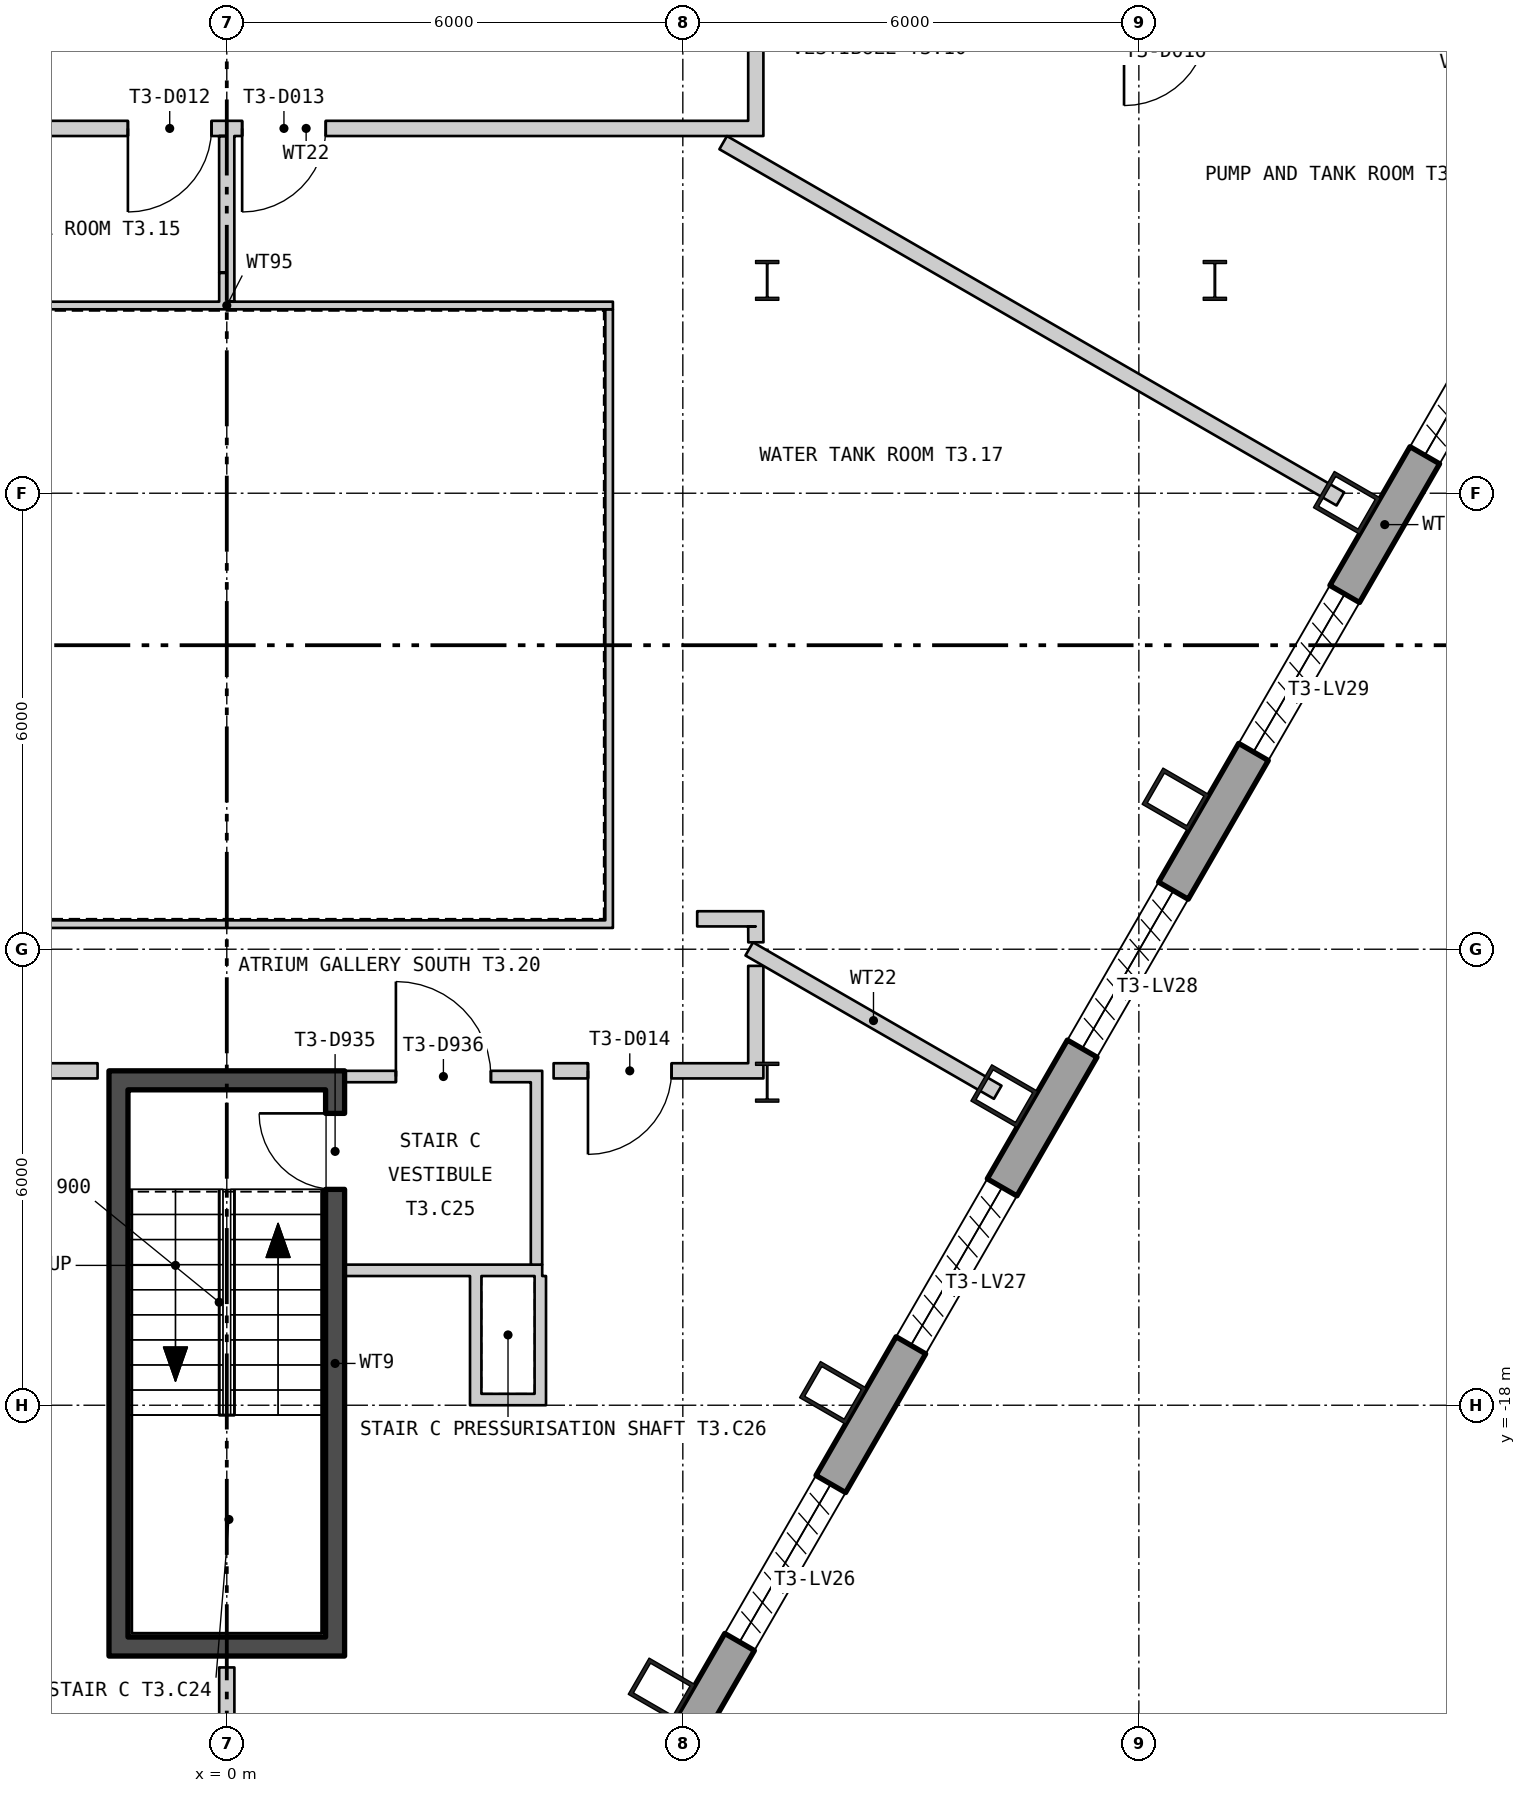
"""IFC4 building model, lengths in metres.
Left out: names, types, materials, properties, quantities, classifications, styles, units other than length and angle.
Written with IfcOpenShell. Run it as: python <this file> out.ifc"""

import sys

from ifc_helpers import new_model, si_unit, direction, frame, frame_2d, origin, origin_2d, place, context, subcontext, project, spatial, polyline, rectangle, hollow_rectangle, i_section, outline, extrude, element, fill, save


model = new_model("IFC4")
c1 = context("Model", 3, precision=1e-05, world=origin(), true_north=direction((0.0, 1.0)))
c2 = subcontext(c1, "Body", "Model", "MODEL_VIEW")
j1 = project(units=[si_unit("LENGTHUNIT", "METRE"), si_unit("PLANEANGLEUNIT", "RADIAN")], contexts=[c1])
p1 = place(None, origin())
s1 = spatial("IfcSite", under=j1, at=p1, CompositionType="ELEMENT")
p2 = place(p1, origin())
s2 = spatial("IfcBuilding", under=s1, at=p2, CompositionType="ELEMENT")
p3 = place(p2, frame((0.0, 0.0, 186.6)))
s3 = spatial("IfcBuildingStorey", under=s2, at=p3, CompositionType="ELEMENT", Elevation=186.6)
for number, where, z_axis, x_axis in (
    (1, (5.722, -21.74, 0.0), (0.0, 0.0, 1.0), (0.5, 0.866, 0.0)),
    (2, (7.976, -17.837, 0.0), (0.0, 0.0, 1.0), (0.5, 0.866, 0.0)),
    (3, (10.23, -13.933, 0.0), (0.0, 0.0, 1.0), (0.5, 0.866, 0.0)),
    (4, (12.483, -10.029, 0.0), (0.0, 0.0, 1.0), (0.5, 0.866, 0.0)),
    (5, (14.737, -6.126, 0.0), (0.0, 0.0, 1.0), (0.5, 0.866, 0.0)),
):
    element("IfcColumn", number, at=place(p3, frame(where, z_axis=z_axis, x_axis=x_axis)), inside=s3, PredefinedType="COLUMN", context=c2, shape_type="SweptSolid", body=[
        extrude(hollow_rectangle(XDim=0.55, YDim=0.7, WallThickness=0.05, at=origin_2d()), origin(), (0.0, 0.0, 1.0), 6.0),
    ])
for number, where, z_axis, x_axis in (
    (6, (7.11, -3.2, 0.0), (0.0, 0.0, 1.0), (1.0, 0.0, 0.0)),
    (7, (7.11, -13.75, 0.0), (0.0, 0.0, 1.0), (1.0, 0.0, 0.0)),
    (8, (13.0, -3.2, 0.0), (0.0, 0.0, 1.0), (1.0, 0.0, 0.0)),
):
    element("IfcColumn", number, at=place(p3, frame(where, z_axis=z_axis, x_axis=x_axis)), inside=s3, PredefinedType="COLUMN", context=c2, shape_type="SweptSolid", body=[
        extrude(i_section(OverallWidth=0.306, OverallDepth=0.524, WebThickness=0.021, FlangeThickness=0.04, at=origin_2d()), origin(), (0.0, 0.0, 1.0), 6.0),
    ])
p4 = place(p3, frame((3.8, -26.219, -0.18), z_axis=(0.0, 0.0, 1.0), x_axis=(0.500000711659, 0.866024992908, 0.0)))
e9 = element("IfcWall", 9, at=p4, inside=s3, PredefinedType="SOLIDWALL", context=c2, shape_type="SweptSolid", body=[
    extrude(outline(polyline([(-0.13, -0.225), (45.87, -0.225), (45.61, 0.225), (0.13, 0.225), (-0.13, -0.225)])), origin(), (0.0, 0.0, 1.0), 6.0),
])
p5 = place(p4, frame((1.424, 0.0, 1.38)))
e10 = element("IfcOpeningElement", 10, at=p5, cuts=e9, PredefinedType="OPENING", context=c2, shape_type="SweptSolid", body=[
    extrude(rectangle(XDim=2.4, YDim=3.6, at=frame_2d((1.2, 1.8))), frame((0.0, 0.235, 0.0), z_axis=(0.0, -1.0, 0.0), x_axis=(1.0, 0.0, 0.0)), (0.0, 0.0, 1.0), 0.47),
])
p6 = place(p4, frame((5.893, 0.0, 1.38)))
e11 = element("IfcOpeningElement", 11, at=p6, cuts=e9, PredefinedType="OPENING", context=c2, shape_type="SweptSolid", body=[
    extrude(rectangle(XDim=2.4, YDim=3.6, at=frame_2d((1.2, 1.8))), frame((0.0, 0.235, 0.0), z_axis=(0.0, -1.0, 0.0), x_axis=(1.0, 0.0, 0.0)), (0.0, 0.0, 1.0), 0.47),
])
p7 = place(p4, frame((10.401, 0.0, 1.38)))
e12 = element("IfcOpeningElement", 12, at=p7, cuts=e9, PredefinedType="OPENING", context=c2, shape_type="SweptSolid", body=[
    extrude(rectangle(XDim=2.4, YDim=3.6, at=frame_2d((1.2, 1.8))), frame((0.0, 0.235, 0.0), z_axis=(0.0, -1.0, 0.0), x_axis=(1.0, 0.0, 0.0)), (0.0, 0.0, 1.0), 0.47),
])
p8 = place(p4, frame((14.909, 0.0, 1.38)))
e13 = element("IfcOpeningElement", 13, at=p8, cuts=e9, PredefinedType="OPENING", context=c2, shape_type="SweptSolid", body=[
    extrude(rectangle(XDim=2.4, YDim=3.6, at=frame_2d((1.2, 1.8))), frame((0.0, 0.235, 0.0), z_axis=(0.0, -1.0, 0.0), x_axis=(1.0, 0.0, 0.0)), (0.0, 0.0, 1.0), 0.47),
])
p9 = place(p4, frame((19.416, 0.0, 1.38)))
e14 = element("IfcOpeningElement", 14, at=p9, cuts=e9, PredefinedType="OPENING", context=c2, shape_type="SweptSolid", body=[
    extrude(rectangle(XDim=2.4, YDim=3.6, at=frame_2d((1.2, 1.8))), frame((0.0, 0.235, 0.0), z_axis=(0.0, -1.0, 0.0), x_axis=(1.0, 0.0, 0.0)), (0.0, 0.0, 1.0), 0.47),
])
p10 = place(p4, frame((23.924, 0.0, 1.38)))
e15 = element("IfcOpeningElement", 15, at=p10, cuts=e9, PredefinedType="OPENING", context=c2, shape_type="SweptSolid", body=[
    extrude(rectangle(XDim=2.4, YDim=3.6, at=frame_2d((1.2, 1.8))), frame((0.0, 0.235, 0.0), z_axis=(0.0, -1.0, 0.0), x_axis=(1.0, 0.0, 0.0)), (0.0, 0.0, 1.0), 0.47),
])
p11 = place(p4, frame((28.431, 0.0, 1.38)))
e16 = element("IfcOpeningElement", 16, at=p11, cuts=e9, PredefinedType="OPENING", context=c2, shape_type="SweptSolid", body=[
    extrude(rectangle(XDim=2.4, YDim=3.6, at=frame_2d((1.2, 1.8))), frame((0.0, 0.235, 0.0), z_axis=(0.0, -1.0, 0.0), x_axis=(1.0, 0.0, 0.0)), (0.0, 0.0, 1.0), 0.47),
])
p12 = place(p4, frame((32.939, 0.0, 1.38)))
e17 = element("IfcOpeningElement", 17, at=p12, cuts=e9, PredefinedType="OPENING", context=c2, shape_type="SweptSolid", body=[
    extrude(rectangle(XDim=2.4, YDim=3.6, at=frame_2d((1.2, 1.8))), frame((0.0, 0.235, 0.0), z_axis=(0.0, -1.0, 0.0), x_axis=(1.0, 0.0, 0.0)), (0.0, 0.0, 1.0), 0.47),
])
p13 = place(p4, frame((37.447, 0.0, 1.38)))
e18 = element("IfcOpeningElement", 18, at=p13, cuts=e9, PredefinedType="OPENING", context=c2, shape_type="SweptSolid", body=[
    extrude(rectangle(XDim=2.4, YDim=3.6, at=frame_2d((1.2, 1.8))), frame((0.0, 0.235, 0.0), z_axis=(0.0, -1.0, 0.0), x_axis=(1.0, 0.0, 0.0)), (0.0, 0.0, 1.0), 0.47),
])
p14 = place(p4, frame((41.916, 0.0, 1.38)))
e19 = element("IfcOpeningElement", 19, at=p14, cuts=e9, PredefinedType="OPENING", context=c2, shape_type="SweptSolid", body=[
    extrude(rectangle(XDim=2.4, YDim=3.6, at=frame_2d((1.2, 1.8))), frame((0.0, 0.235, 0.0), z_axis=(0.0, -1.0, 0.0), x_axis=(1.0, 0.0, 0.0)), (0.0, 0.0, 1.0), 0.47),
])
p15 = place(p3, frame((-5.08, -11.67, 0.0), z_axis=(0.0, 0.0, 1.0), x_axis=(1.0, 0.0, 0.0)))
e20 = element("IfcWall", 20, at=p15, inside=s3, PredefinedType="PARTITIONING", context=c2, shape_type="SweptSolid", body=[
    extrude(rectangle(XDim=10.16, YDim=0.1, at=frame_2d((5.08, 0.0))), origin(), (0.0, 0.0, 1.0), 5.8),
])
p16 = place(p3, frame((5.03, -11.62, 0.0), z_axis=(0.0, 0.0, 1.0), x_axis=(0.0, 1.0, 0.0)))
e21 = element("IfcWall", 21, at=p16, inside=s3, PredefinedType="PARTITIONING", context=c2, shape_type="SweptSolid", body=[
    extrude(rectangle(XDim=8.04, YDim=0.1, at=frame_2d((4.02, 0.0))), origin(), (0.0, 0.0, 1.0), 5.8),
])
p17 = place(p3, frame((5.08, -3.53, 0.0), z_axis=(0.0, 0.0, 1.0), x_axis=(-1.0, 0.0, 0.0)))
e22 = element("IfcWall", 22, at=p17, inside=s3, PredefinedType="PARTITIONING", context=c2, shape_type="SweptSolid", body=[
    extrude(rectangle(XDim=10.16, YDim=0.1, at=frame_2d((5.08, 0.0))), origin(), (0.0, 0.0, 1.0), 5.8),
])
p18 = place(p3, frame((-1.425, -21.05, 0.0), z_axis=(0.0, 0.0, 1.0), x_axis=(0.0, 1.0, 0.0)))
e23 = element("IfcWall", 23, at=p18, inside=s3, PredefinedType="SHEAR", context=c2, shape_type="SweptSolid", body=[
    extrude(rectangle(XDim=7.2, YDim=0.25, at=frame_2d((3.6, 0.0))), origin(), (0.0, 0.0, 1.0), 5.8),
])
p19 = place(p3, frame((1.425, -21.05, 0.0), z_axis=(0.0, 0.0, 1.0), x_axis=(0.0, 1.0, 0.0)))
e24 = element("IfcWall", 24, at=p19, inside=s3, PredefinedType="SHEAR", context=c2, shape_type="SweptSolid", body=[
    extrude(rectangle(XDim=7.2, YDim=0.25, at=frame_2d((3.6, 0.0))), origin(), (0.0, 0.0, 1.0), 5.8),
])
p20 = place(p19, frame((5.89, 0.0, 0.0)))
e25 = element("IfcOpeningElement", 25, at=p20, cuts=e24, PredefinedType="OPENING", context=c2, shape_type="SweptSolid", body=[
    extrude(rectangle(XDim=1.0, YDim=2.1, at=frame_2d((0.5, 1.05))), frame((0.0, 0.135, 0.0), z_axis=(0.0, -1.0, 0.0), x_axis=(1.0, 0.0, 0.0)), (0.0, 0.0, 1.0), 0.27),
])
for number, where, z_axis, x_axis in (
    (26, (-1.55, -21.175, 0.0), (0.0, 0.0, 1.0), (1.0, 0.0, 0.0)),
    (27, (-1.55, -13.725, 0.0), (0.0, 0.0, 1.0), (1.0, 0.0, 0.0)),
):
    element("IfcWall", number, at=place(p3, frame(where, z_axis=z_axis, x_axis=x_axis)), inside=s3, PredefinedType="SHEAR", context=c2, shape_type="SweptSolid", body=[
        extrude(rectangle(XDim=3.1, YDim=0.25, at=frame_2d((1.55, 0.0))), origin(), (0.0, 0.0, 1.0), 5.8),
    ])
p21 = place(p3, frame((1.55, -16.225, 0.0), z_axis=(0.0, 0.0, 1.0), x_axis=(1.0, 0.0, 0.0)))
e28 = element("IfcWall", 28, at=p21, inside=s3, PredefinedType="PARTITIONING", context=c2, shape_type="SweptSolid", body=[
    extrude(rectangle(XDim=2.6, YDim=0.15, at=frame_2d((1.3, 0.0))), origin(), (0.0, 0.0, 1.0), 5.8),
])
p22 = place(p3, frame((4.075, -16.15, 0.0), z_axis=(0.0, 0.0, 1.0), x_axis=(0.0, 1.0, 0.0)))
e29 = element("IfcWall", 29, at=p22, inside=s3, PredefinedType="PARTITIONING", context=c2, shape_type="SweptSolid", body=[
    extrude(rectangle(XDim=2.4, YDim=0.15, at=frame_2d((1.2, 0.0))), origin(), (0.0, 0.0, 1.0), 5.8),
])
p23 = place(p3, frame((1.55, -13.675, 0.0), z_axis=(0.0, 0.0, 1.0), x_axis=(1.0, 0.0, 0.0)))
e30 = element("IfcWall", 30, at=p23, inside=s3, PredefinedType="PARTITIONING", context=c2, shape_type="SweptSolid", body=[
    extrude(rectangle(XDim=2.6, YDim=0.15, at=frame_2d((1.3, 0.0))), origin(), (0.0, 0.0, 1.0), 5.01),
])
p24 = place(p23, frame((0.675, 0.0, 0.0)))
e31 = element("IfcOpeningElement", 31, at=p24, cuts=e30, PredefinedType="OPENING", context=c2, shape_type="SweptSolid", body=[
    extrude(rectangle(XDim=1.25, YDim=2.1, at=frame_2d((0.625, 1.05))), frame((0.0, 0.085, 0.0), z_axis=(0.0, -1.0, 0.0), x_axis=(1.0, 0.0, 0.0)), (0.0, 0.0, 1.0), 0.17),
])
p25 = place(p3, frame((3.275, -18.0, 0.0), z_axis=(0.0, 0.0, 1.0), x_axis=(0.0, 1.0, 0.0)))
e32 = element("IfcWall", 32, at=p25, inside=s3, PredefinedType="PARTITIONING", context=c2, shape_type="SweptSolid", body=[
    extrude(rectangle(XDim=1.7, YDim=0.15, at=frame_2d((0.85, 0.0))), origin(), (0.0, 0.0, 1.0), 5.11),
])
p26 = place(p3, frame((3.35, -17.925, 0.0), z_axis=(0.0, 0.0, 1.0), x_axis=(1.0, 0.0, 0.0)))
e33 = element("IfcWall", 33, at=p26, inside=s3, PredefinedType="PARTITIONING", context=c2, shape_type="SweptSolid", body=[
    extrude(rectangle(XDim=0.7, YDim=0.15, at=frame_2d((0.35, 0.0))), origin(), (0.0, 0.0, 1.0), 5.8),
])
p27 = place(p3, frame((4.125, -18.0, 0.0), z_axis=(0.0, 0.0, 1.0), x_axis=(0.0, 1.0, 0.0)))
e34 = element("IfcWall", 34, at=p27, inside=s3, PredefinedType="PARTITIONING", context=c2, shape_type="SweptSolid", body=[
    extrude(rectangle(XDim=1.7, YDim=0.15, at=frame_2d((0.85, 0.0))), origin(), (0.0, 0.0, 1.0), 5.8),
])
p28 = place(p3, frame((-6.86, -13.6, 0.0), z_axis=(0.0, 0.0, 1.0), x_axis=(1.0, 0.0, 0.0)))
e35 = element("IfcWall", 35, at=p28, inside=s3, PredefinedType="PARTITIONING", context=c2, shape_type="SweptSolid", body=[
    extrude(rectangle(XDim=5.16, YDim=0.2, at=frame_2d((2.58, 0.0))), origin(), (0.0, 0.0, 1.0), 5.01),
])
p29 = place(p28, frame((2.949, 0.0, 0.0)))
e36 = element("IfcOpeningElement", 36, at=p29, cuts=e35, PredefinedType="OPENING", context=c2, shape_type="SweptSolid", body=[
    extrude(rectangle(XDim=1.1, YDim=2.1, at=frame_2d((0.55, 1.05))), frame((0.0, 0.11, 0.0), z_axis=(0.0, -1.0, 0.0), x_axis=(1.0, 0.0, 0.0)), (0.0, 0.0, 1.0), 0.22),
])
p30 = place(p3, frame((-4.972, -1.2, 0.0), z_axis=(0.0, 0.0, 1.0), x_axis=(1.0, 0.0, 0.0)))
e37 = element("IfcWall", 37, at=p30, inside=s3, PredefinedType="PARTITIONING", context=c2, shape_type="SweptSolid", body=[
    extrude(rectangle(XDim=12.032, YDim=0.2, at=frame_2d((6.016, 0.0))), origin(), (0.0, 0.0, 1.0), 5.8),
])
p31 = place(p30, frame((3.671, 0.0, 0.0)))
e38 = element("IfcOpeningElement", 38, at=p31, cuts=e37, PredefinedType="OPENING", context=c2, shape_type="SweptSolid", body=[
    extrude(rectangle(XDim=1.1, YDim=2.1, at=frame_2d((0.55, 1.05))), frame((0.0, 0.11, 0.0), z_axis=(0.0, -1.0, 0.0), x_axis=(1.0, 0.0, 0.0)), (0.0, 0.0, 1.0), 0.22),
])
p32 = place(p30, frame((5.174, 0.0, 0.0)))
e39 = element("IfcOpeningElement", 39, at=p32, cuts=e37, PredefinedType="OPENING", context=c2, shape_type="SweptSolid", body=[
    extrude(rectangle(XDim=1.1, YDim=2.1, at=frame_2d((0.55, 1.05))), frame((0.0, 0.11, 0.0), z_axis=(0.0, -1.0, 0.0), x_axis=(1.0, 0.0, 0.0)), (0.0, 0.0, 1.0), 0.22),
])
p33 = place(p3, frame((-0.001, -1.3, 0.0), z_axis=(0.0, 0.0, 1.0), x_axis=(0.000444444401, -0.999999901235, 0.0)))
e40 = element("IfcWall", 40, at=p33, inside=s3, PredefinedType="PARTITIONING", context=c2, shape_type="SweptSolid", body=[
    extrude(rectangle(XDim=1.8, YDim=0.2, at=frame_2d((0.9, 0.0))), origin(), (0.0, 0.0, 1.0), 5.25),
])
p34 = place(p3, frame((-0.0, -3.1, 0.0), z_axis=(0.0, 0.0, 1.0), x_axis=(0.000526315717, -0.999999861496, 0.0)))
e41 = element("IfcWall", 41, at=p34, inside=s3, PredefinedType="PARTITIONING", context=c2, shape_type="SweptSolid", body=[
    extrude(rectangle(XDim=0.38, YDim=0.2, at=frame_2d((0.19, 0.0))), origin(), (0.0, 0.0, 1.0), 5.8),
])
p35 = place(p3, frame((0.0, -25.544, 0.0), z_axis=(0.0, 0.0, 1.0), x_axis=(0.0, 1.0, 0.0)))
e42 = element("IfcWall", 42, at=p35, inside=s3, PredefinedType="PARTITIONING", context=c2, shape_type="SweptSolid", body=[
    extrude(rectangle(XDim=4.094, YDim=0.2, at=frame_2d((2.047, 0.0))), origin(), (0.0, 0.0, 1.0), 5.25),
])
p36 = place(p3, frame((4.3, -13.6, 0.0), z_axis=(0.0, 0.0, 1.0), x_axis=(1.0, 0.0, 0.0)))
e43 = element("IfcWall", 43, at=p36, inside=s3, PredefinedType="PARTITIONING", context=c2, shape_type="SweptSolid", body=[
    extrude(rectangle(XDim=2.76, YDim=0.2, at=frame_2d((1.38, 0.0))), origin(), (0.0, 0.0, 1.0), 5.01),
])
p37 = place(p36, frame((0.452, 0.0, 0.0)))
e44 = element("IfcOpeningElement", 44, at=p37, cuts=e43, PredefinedType="OPENING", context=c2, shape_type="SweptSolid", body=[
    extrude(rectangle(XDim=1.1, YDim=2.1, at=frame_2d((0.55, 1.05))), frame((0.0, 0.11, 0.0), z_axis=(0.0, -1.0, 0.0), x_axis=(1.0, 0.0, 0.0)), (0.0, 0.0, 1.0), 0.22),
])
p38 = place(p3, frame((6.189, -11.6, 0.0), z_axis=(0.0, 0.0, 1.0), x_axis=(1.0, 0.0, 0.0)))
e45 = element("IfcWall", 45, at=p38, inside=s3, PredefinedType="PARTITIONING", context=c2, shape_type="SweptSolid", body=[
    extrude(rectangle(XDim=0.871, YDim=0.2, at=frame_2d((0.435, 0.0))), origin(), (0.0, 0.0, 1.0), 5.8),
])
p39 = place(p3, frame((6.531, -1.387, 0.0), z_axis=(0.0, 0.0, 1.0), x_axis=(0.866029291668, -0.499993265928, 0.0)))
e46 = element("IfcWall", 46, at=p39, inside=s3, PredefinedType="PARTITIONING", context=c2, shape_type="SweptSolid", body=[
    extrude(rectangle(XDim=9.376, YDim=0.2, at=frame_2d((4.688, 0.0))), origin(), (0.0, 0.0, 1.0), 5.8),
])
p40 = place(p3, frame((6.874, -11.996, 0.0), z_axis=(0.0, 0.0, 1.0), x_axis=(0.866181174779, -0.499730099612, 0.0)))
e47 = element("IfcWall", 47, at=p40, inside=s3, PredefinedType="PARTITIONING", context=c2, shape_type="SweptSolid", body=[
    extrude(rectangle(XDim=3.774, YDim=0.2, at=frame_2d((1.887, 0.0))), origin(), (0.0, 0.0, 1.0), 5.8),
])
p41 = place(p3, frame((6.96, -13.5, 0.0), z_axis=(0.0, 0.0, 1.0), x_axis=(0.0, 1.0, 0.0)))
e48 = element("IfcWall", 48, at=p41, inside=s3, PredefinedType="PARTITIONING", context=c2, shape_type="SweptSolid", body=[
    extrude(rectangle(XDim=1.281, YDim=0.2, at=frame_2d((0.64, 0.0))), origin(), (0.0, 0.0, 1.0), 5.21),
])
p42 = place(p3, frame((6.96, -1.1, 0.0), z_axis=(0.0, 0.0, 1.0), x_axis=(0.0, 1.0, 0.0)))
e49 = element("IfcWall", 49, at=p42, inside=s3, PredefinedType="PARTITIONING", context=c2, shape_type="SweptSolid", body=[
    extrude(rectangle(XDim=1.2, YDim=0.2, at=frame_2d((0.6, 0.0))), origin(), (0.0, 0.0, 1.0), 5.8),
])
p43 = place(p3, frame((6.96, -11.7, 0.0), z_axis=(0.0, 0.0, 1.0), x_axis=(0.004784634228, -0.999988553572, 0.0)))
e50 = element("IfcWall", 50, at=p43, inside=s3, PredefinedType="PARTITIONING", context=c2, shape_type="SweptSolid", body=[
    extrude(rectangle(XDim=0.209, YDim=0.2, at=frame_2d((0.104, 0.0))), origin(), (0.0, 0.0, 1.0), 5.8),
])
p44 = place(p20, origin())
e51 = element("IfcDoor", 51, at=p44, inside=s3, OperationType="SINGLE_SWING_LEFT", PredefinedType="DOOR", context=c2, shape_type="SweptSolid", body=[
    extrude(rectangle(XDim=1.0, YDim=2.1, at=frame_2d((0.5, 1.05))), frame((0.0, 0.025, 0.0), z_axis=(0.0, -1.0, 0.0), x_axis=(1.0, 0.0, 0.0)), (0.0, 0.0, 1.0), 0.05),
])
fill(e25, e51)
p45 = place(p24, origin())
e52 = element("IfcDoor", 52, at=p45, inside=s3, OperationType="SINGLE_SWING_RIGHT", PredefinedType="DOOR", context=c2, shape_type="SweptSolid", body=[
    extrude(rectangle(XDim=1.25, YDim=2.1, at=frame_2d((0.625, 1.05))), frame((0.0, 0.025, 0.0), z_axis=(0.0, -1.0, 0.0), x_axis=(1.0, 0.0, 0.0)), (0.0, 0.0, 1.0), 0.05),
])
fill(e31, e52)
p46 = place(p31, origin())
e53 = element("IfcDoor", 53, at=p46, inside=s3, OperationType="SINGLE_SWING_LEFT", PredefinedType="DOOR", context=c2, shape_type="SweptSolid", body=[
    extrude(rectangle(XDim=1.1, YDim=2.1, at=frame_2d((0.55, 1.05))), frame((0.0, 0.025, 0.0), z_axis=(0.0, -1.0, 0.0), x_axis=(1.0, 0.0, 0.0)), (0.0, 0.0, 1.0), 0.05),
])
fill(e38, e53)
p47 = place(p32, origin())
e54 = element("IfcDoor", 54, at=p47, inside=s3, OperationType="SINGLE_SWING_LEFT", PredefinedType="DOOR", context=c2, shape_type="SweptSolid", body=[
    extrude(rectangle(XDim=1.1, YDim=2.1, at=frame_2d((0.55, 1.05))), frame((0.0, 0.025, 0.0), z_axis=(0.0, -1.0, 0.0), x_axis=(1.0, 0.0, 0.0)), (0.0, 0.0, 1.0), 0.05),
])
fill(e39, e54)
p48 = place(p37, origin())
e55 = element("IfcDoor", 55, at=p48, inside=s3, OperationType="SINGLE_SWING_LEFT", PredefinedType="DOOR", context=c2, shape_type="SweptSolid", body=[
    extrude(rectangle(XDim=1.1, YDim=2.1, at=frame_2d((0.55, 1.05))), frame((0.0, 0.025, 0.0), z_axis=(0.0, -1.0, 0.0), x_axis=(1.0, 0.0, 0.0)), (0.0, 0.0, 1.0), 0.05),
])
fill(e44, e55)
save(model, sys.argv[1])
